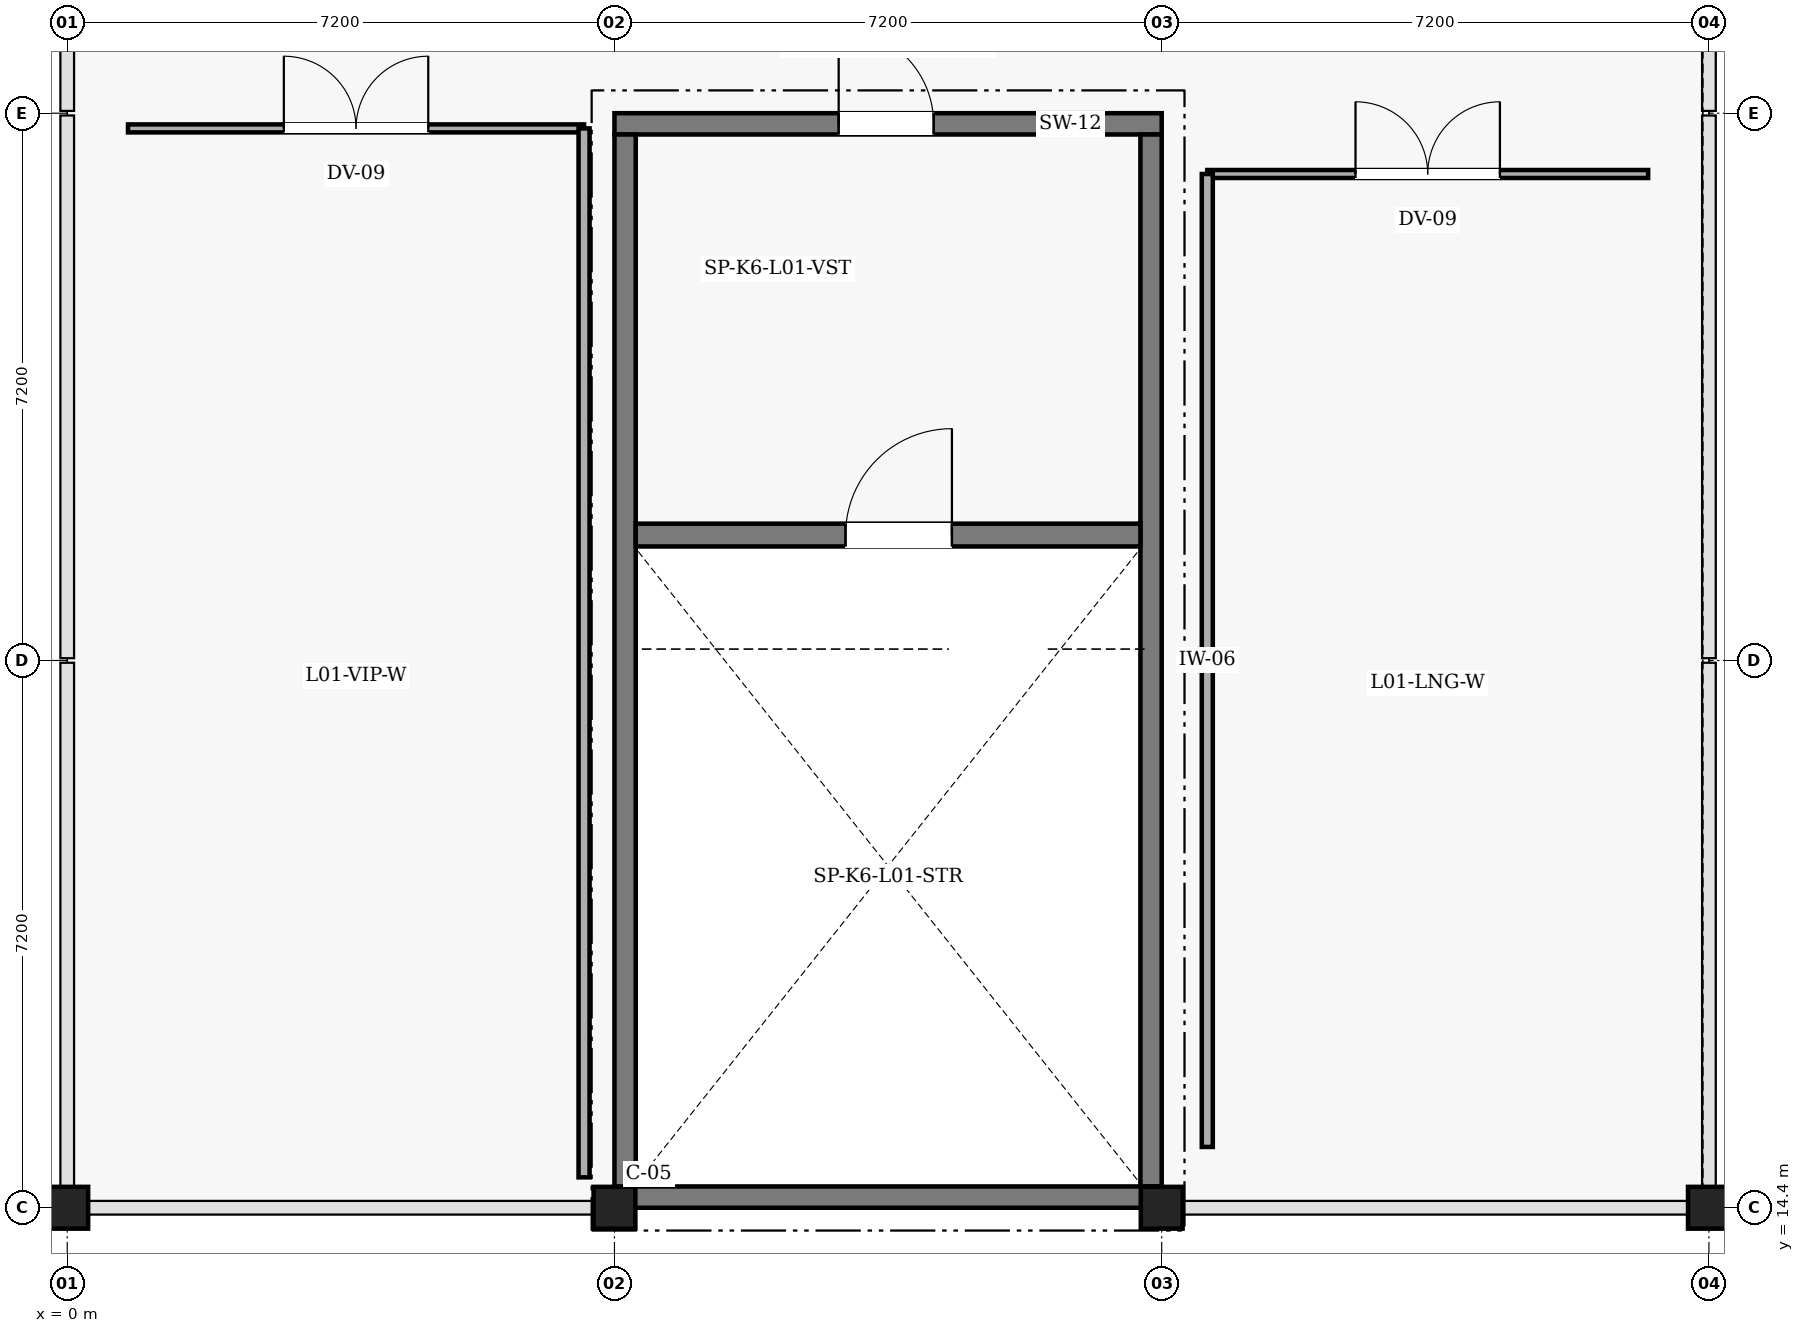
"""IFC4 building model, lengths in metres.
Left out: names, types, materials, properties, quantities, classifications, styles, units other than length and angle.
Written with IfcOpenShell. Run it as: python <this file> out.ifc"""

import sys

from ifc_helpers import new_model, si_unit, direction, frame, frame_2d, origin, origin_2d, place, context, subcontext, project, spatial, rectangle, extrude, element, fill, save


model = new_model("IFC4")
c1 = context("Model", 3, precision=1e-05, world=origin(), true_north=direction((0.0, 1.0)))
c2 = subcontext(c1, "Body", "Model", "MODEL_VIEW")
j1 = project(units=[si_unit("LENGTHUNIT", "METRE"), si_unit("PLANEANGLEUNIT", "RADIAN")], contexts=[c1])
p1 = place(None, origin())
s1 = spatial("IfcSite", under=j1, at=p1, CompositionType="ELEMENT")
p2 = place(p1, origin())
s2 = spatial("IfcBuilding", under=s1, at=p2, CompositionType="ELEMENT")
p3 = place(p2, frame((0.0, 0.0, 5.4)))
s3 = spatial("IfcBuildingStorey", under=s2, at=p3, CompositionType="ELEMENT", Elevation=5.4)
p4 = place(p3, frame((7.2, 28.66, 0.0), z_axis=(0.0, 0.0, 1.0), x_axis=(1.0, 0.0, 0.0)))
e1 = element("IfcWall", 1, at=p4, inside=s3, PredefinedType="SHEAR", context=c2, shape_type="SweptSolid", body=[
    extrude(rectangle(XDim=7.2, YDim=0.28, at=frame_2d((3.6, 0.0))), origin(), (0.0, 0.0, 1.0), 4.2),
])
p5 = place(p4, frame((2.95, 0.0, 0.0)))
e2 = element("IfcOpeningElement", 2, at=p5, cuts=e1, PredefinedType="OPENING", context=c2, shape_type="SweptSolid", body=[
    extrude(rectangle(XDim=1.25, YDim=2.2, at=frame_2d((0.625, 1.1))), frame((0.0, 0.15, 0.0), z_axis=(0.0, -1.0, 0.0), x_axis=(1.0, 0.0, 0.0)), (0.0, 0.0, 1.0), 0.3),
])
p6 = place(p3, frame((14.26, 28.52, 0.0), z_axis=(0.0, 0.0, 1.0), x_axis=(0.0, -1.0, 0.0)))
e3 = element("IfcWall", 3, at=p6, inside=s3, PredefinedType="SHEAR", context=c2, shape_type="SweptSolid", body=[
    extrude(rectangle(XDim=13.84, YDim=0.28, at=frame_2d((6.92, 0.0))), origin(), (0.0, 0.0, 1.0), 4.2),
])
p7 = place(p3, frame((14.4, 14.54, 0.0), z_axis=(0.0, 0.0, 1.0), x_axis=(-1.0, 0.0, 0.0)))
e4 = element("IfcWall", 4, at=p7, inside=s3, PredefinedType="SHEAR", context=c2, shape_type="SweptSolid", body=[
    extrude(rectangle(XDim=7.2, YDim=0.28, at=frame_2d((3.6, 0.0))), origin(), (0.0, 0.0, 1.0), 4.2),
])
p8 = place(p3, frame((7.34, 14.68, 0.0), z_axis=(0.0, 0.0, 1.0), x_axis=(0.0, 1.0, 0.0)))
e5 = element("IfcWall", 5, at=p8, inside=s3, PredefinedType="SHEAR", context=c2, shape_type="SweptSolid", body=[
    extrude(rectangle(XDim=13.84, YDim=0.28, at=frame_2d((6.92, 0.0))), origin(), (0.0, 0.0, 1.0), 4.2),
])
p9 = place(p3, frame((7.48, 23.25, 0.0), z_axis=(0.0, 0.0, 1.0), x_axis=(1.0, 0.0, 0.0)))
e6 = element("IfcWall", 6, at=p9, inside=s3, PredefinedType="SHEAR", context=c2, shape_type="SweptSolid", body=[
    extrude(rectangle(XDim=6.64, YDim=0.3, at=frame_2d((3.32, 0.0))), origin(), (0.0, 0.0, 1.0), 4.2),
])
p10 = place(p9, frame((2.76, 0.0, 0.0)))
e7 = element("IfcOpeningElement", 7, at=p10, cuts=e6, PredefinedType="OPENING", context=c2, shape_type="SweptSolid", body=[
    extrude(rectangle(XDim=1.4, YDim=2.2, at=frame_2d((0.7, 1.1))), frame((0.0, 0.16, 0.0), z_axis=(0.0, -1.0, 0.0), x_axis=(1.0, 0.0, 0.0)), (0.0, 0.0, 1.0), 0.32),
])
for number, where, z_axis, x_axis in (
    (8, (0.0, 14.4, 0.0), (0.0, 0.0, 1.0), (1.0, 0.0, 0.0)),
    (9, (7.2, 14.4, 0.0), (0.0, 0.0, 1.0), (1.0, 0.0, 0.0)),
    (10, (14.4, 14.4, 0.0), (0.0, 0.0, 1.0), (1.0, 0.0, 0.0)),
    (11, (21.6, 14.4, 0.0), (0.0, 0.0, 1.0), (1.0, 0.0, 0.0)),
):
    element("IfcColumn", number, at=place(p3, frame(where, z_axis=z_axis, x_axis=x_axis)), inside=s3, PredefinedType="COLUMN", context=c2, shape_type="SweptSolid", body=[
        extrude(rectangle(XDim=0.55, YDim=0.55, at=origin_2d()), origin(), (0.0, 0.0, 1.0), 3.6),
    ])
p11 = place(p3, frame((15.0, 28.0, 0.0), z_axis=(0.0, 0.0, 1.0), x_axis=(1.0, 0.0, 0.0)))
e12 = element("IfcWall", 12, at=p11, inside=s3, PredefinedType="PARTITIONING", context=c2, shape_type="SweptSolid", body=[
    extrude(rectangle(XDim=5.8, YDim=0.105, at=frame_2d((2.9, 0.0))), origin(), (0.0, 0.0, 1.0), 3.85),
])
p12 = place(p11, frame((1.95, 0.0, 0.0)))
e13 = element("IfcOpeningElement", 13, at=p12, cuts=e12, PredefinedType="OPENING", context=c2, shape_type="SweptSolid", body=[
    extrude(rectangle(XDim=1.9, YDim=2.3, at=frame_2d((0.95, 1.15))), frame((0.0, 0.062, 0.0), z_axis=(0.0, -1.0, 0.0), x_axis=(1.0, 0.0, 0.0)), (0.0, 0.0, 1.0), 0.125),
])
p13 = place(p3, frame((15.0, 15.2, 0.0), z_axis=(0.0, 0.0, 1.0), x_axis=(0.0, 1.0, 0.0)))
e14 = element("IfcWall", 14, at=p13, inside=s3, PredefinedType="PARTITIONING", context=c2, shape_type="SweptSolid", body=[
    extrude(rectangle(XDim=12.8, YDim=0.145, at=frame_2d((6.4, 0.0))), origin(), (0.0, 0.0, 1.0), 3.85),
])
p14 = place(p3, frame((0.8, 28.6, 0.0), z_axis=(0.0, 0.0, 1.0), x_axis=(1.0, 0.0, 0.0)))
e15 = element("IfcWall", 15, at=p14, inside=s3, PredefinedType="PARTITIONING", context=c2, shape_type="SweptSolid", body=[
    extrude(rectangle(XDim=6.0, YDim=0.105, at=frame_2d((3.0, 0.0))), origin(), (0.0, 0.0, 1.0), 3.85),
])
p15 = place(p14, frame((2.05, 0.0, 0.0)))
e16 = element("IfcOpeningElement", 16, at=p15, cuts=e15, PredefinedType="OPENING", context=c2, shape_type="SweptSolid", body=[
    extrude(rectangle(XDim=1.9, YDim=2.3, at=frame_2d((0.95, 1.15))), frame((0.0, 0.062, 0.0), z_axis=(0.0, -1.0, 0.0), x_axis=(1.0, 0.0, 0.0)), (0.0, 0.0, 1.0), 0.125),
])
p16 = place(p3, frame((6.8, 28.6, 0.0), z_axis=(0.0, 0.0, 1.0), x_axis=(0.0, -1.0, 0.0)))
e17 = element("IfcWall", 17, at=p16, inside=s3, PredefinedType="PARTITIONING", context=c2, shape_type="SweptSolid", body=[
    extrude(rectangle(XDim=13.8, YDim=0.145, at=frame_2d((6.9, 0.0))), origin(), (0.0, 0.0, 1.0), 3.85),
])
p17 = place(p10, origin())
e18 = element("IfcDoor", 18, at=p17, inside=s3, OperationType="SINGLE_SWING_RIGHT", PredefinedType="DOOR", context=c2, shape_type="SweptSolid", body=[
    extrude(rectangle(XDim=1.4, YDim=2.2, at=frame_2d((0.7, 1.1))), frame((0.0, 0.025, 0.0), z_axis=(0.0, -1.0, 0.0), x_axis=(1.0, 0.0, 0.0)), (0.0, 0.0, 1.0), 0.05),
])
fill(e7, e18)
p18 = place(p5, origin())
e19 = element("IfcDoor", 19, at=p18, inside=s3, OperationType="SINGLE_SWING_LEFT", PredefinedType="DOOR", context=c2, shape_type="SweptSolid", body=[
    extrude(rectangle(XDim=1.25, YDim=2.2, at=frame_2d((0.625, 1.1))), frame((0.0, 0.025, 0.0), z_axis=(0.0, -1.0, 0.0), x_axis=(1.0, 0.0, 0.0)), (0.0, 0.0, 1.0), 0.05),
])
fill(e2, e19)
p19 = place(p12, origin())
e20 = element("IfcDoor", 20, at=p19, inside=s3, OperationType="DOUBLE_DOOR_SINGLE_SWING", PredefinedType="DOOR", context=c2, shape_type="SweptSolid", body=[
    extrude(rectangle(XDim=1.9, YDim=2.3, at=frame_2d((0.95, 1.15))), frame((0.0, 0.025, 0.0), z_axis=(0.0, -1.0, 0.0), x_axis=(1.0, 0.0, 0.0)), (0.0, 0.0, 1.0), 0.05),
])
fill(e13, e20)
p20 = place(p15, origin())
e21 = element("IfcDoor", 21, at=p20, inside=s3, OperationType="DOUBLE_DOOR_SINGLE_SWING", PredefinedType="DOOR", context=c2, shape_type="SweptSolid", body=[
    extrude(rectangle(XDim=1.9, YDim=2.3, at=frame_2d((0.95, 1.15))), frame((0.0, 0.025, 0.0), z_axis=(0.0, -1.0, 0.0), x_axis=(1.0, 0.0, 0.0)), (0.0, 0.0, 1.0), 0.05),
])
fill(e16, e21)
save(model, sys.argv[1])
